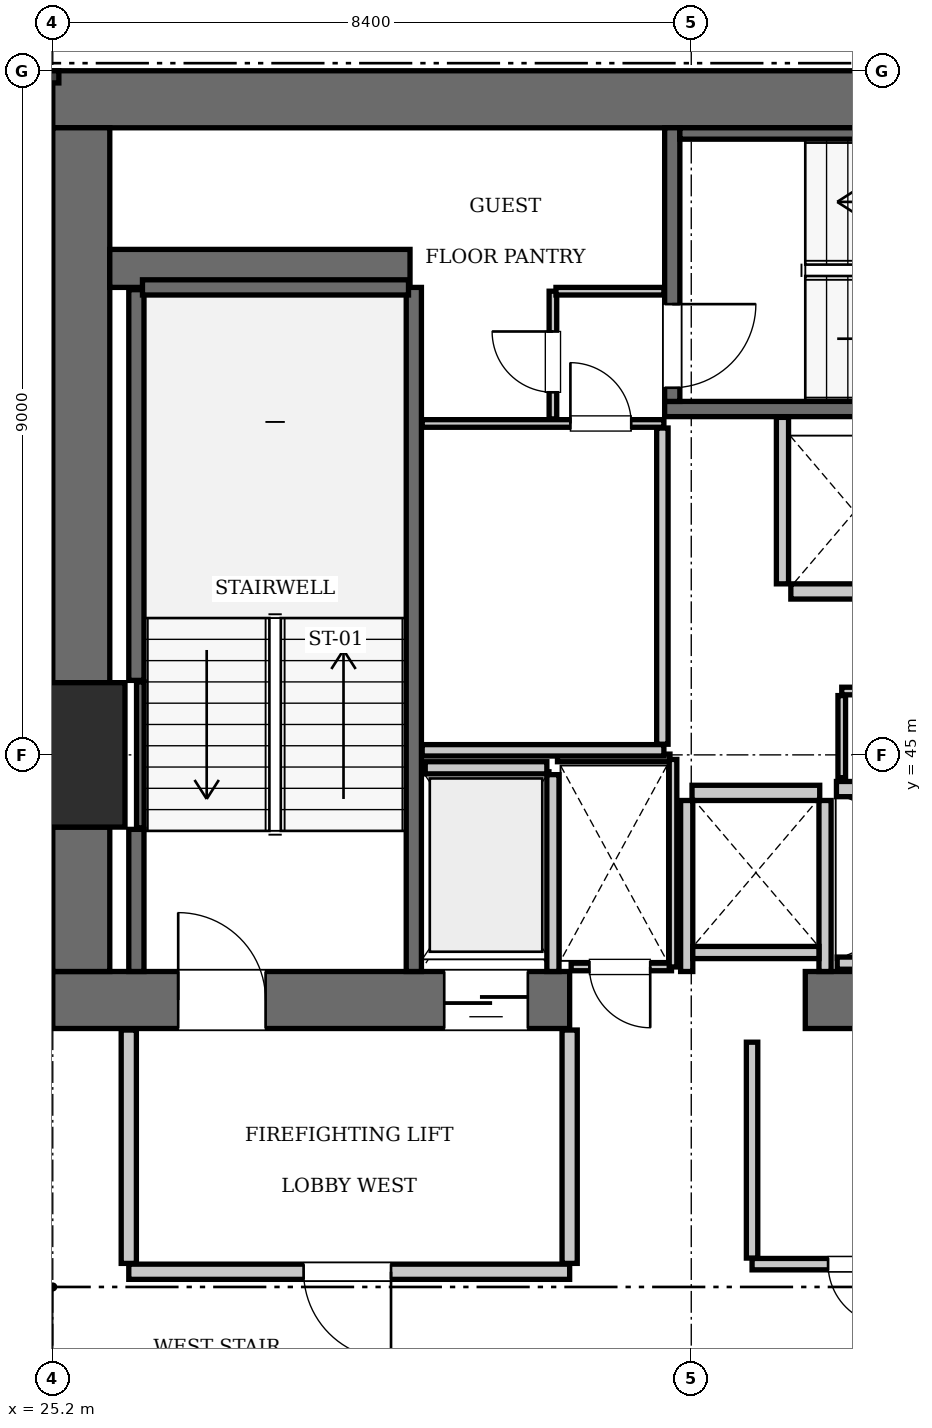
"""IFC4 building model, lengths in metres.
Left out: names, types, materials, properties, quantities, classifications, styles, units other than length and angle.
Written with IfcOpenShell. Run it as: python <this file> out.ifc"""

import sys

from ifc_helpers import new_model, si_unit, direction, frame, frame_2d, origin, origin_2d, place, context, subcontext, project, spatial, rectangle, extrude, element, fill, save


model = new_model("IFC4")
c1 = context("Model", 3, precision=1e-05, world=origin(), true_north=direction((0.0, 1.0)))
c2 = subcontext(c1, "Body", "Model", "MODEL_VIEW")
j1 = project(units=[si_unit("LENGTHUNIT", "METRE"), si_unit("PLANEANGLEUNIT", "RADIAN")], contexts=[c1])
p1 = place(None, origin())
s1 = spatial("IfcSite", under=j1, at=p1, CompositionType="ELEMENT")
p2 = place(p1, origin())
s2 = spatial("IfcBuilding", under=s1, at=p2, CompositionType="ELEMENT")
p3 = place(p2, frame((0.0, 0.0, 135.1)))
s3 = spatial("IfcBuildingStorey", under=s2, at=p3, CompositionType="ELEMENT", Elevation=135.1)
p4 = place(p3, frame((25.2, 45.0, 0.0), z_axis=(0.0, 0.0, 1.0), x_axis=(1.0, 0.0, 0.0)))
e1 = element("IfcColumn", 1, at=p4, inside=s3, PredefinedType="COLUMN", context=c2, shape_type="SweptSolid", body=[
    extrude(rectangle(XDim=1.9, YDim=1.9, at=origin_2d()), origin(), (0.0, 0.0, 1.0), 3.85),
])
p5 = place(p3, frame((25.2, 53.625, 0.0), z_axis=(0.0, 0.0, 1.0), x_axis=(1.0, 0.0, 0.0)))
e2 = element("IfcWall", 2, at=p5, inside=s3, PredefinedType="SHEAR", context=c2, shape_type="SweptSolid", body=[
    extrude(rectangle(XDim=25.2, YDim=0.75, at=frame_2d((12.6, 0.0))), origin(), (0.0, 0.0, 1.0), 3.85),
])
p6 = place(p3, frame((25.2, 41.775, 0.0), z_axis=(0.0, 0.0, 1.0), x_axis=(1.0, 0.0, 0.0)))
e3 = element("IfcWall", 3, at=p6, inside=s3, PredefinedType="SHEAR", context=c2, shape_type="SweptSolid", body=[
    extrude(rectangle(XDim=6.8, YDim=0.75, at=frame_2d((3.4, 0.0))), origin(), (0.0, 0.0, 1.0), 3.85),
])
p7 = place(p6, frame((1.65, 0.0, 0.0)))
e4 = element("IfcOpeningElement", 4, at=p7, cuts=e3, PredefinedType="OPENING", context=c2, shape_type="SweptSolid", body=[
    extrude(rectangle(XDim=1.15, YDim=2.15, at=frame_2d((0.575, 1.075))), frame((0.0, 0.385, 0.0), z_axis=(0.0, -1.0, 0.0), x_axis=(1.0, 0.0, 0.0)), (0.0, 0.0, 1.0), 0.77),
])
p8 = place(p6, frame((5.15, 0.0, 0.0)))
e5 = element("IfcOpeningElement", 5, at=p8, cuts=e3, PredefinedType="OPENING", context=c2, shape_type="SweptSolid", body=[
    extrude(rectangle(XDim=1.1, YDim=2.2, at=frame_2d((0.55, 1.1))), frame((0.0, 0.385, 0.0), z_axis=(0.0, -1.0, 0.0), x_axis=(1.0, 0.0, 0.0)), (0.0, 0.0, 1.0), 0.77),
])
p9 = place(p3, frame((35.1, 41.775, 0.0), z_axis=(0.0, 0.0, 1.0), x_axis=(1.0, 0.0, 0.0)))
e6 = element("IfcWall", 6, at=p9, inside=s3, PredefinedType="SHEAR", context=c2, shape_type="SweptSolid", body=[
    extrude(rectangle(XDim=5.4, YDim=0.75, at=frame_2d((2.7, 0.0))), origin(), (0.0, 0.0, 1.0), 3.85),
])
p10 = place(p3, frame((25.575, 42.15, 0.0), z_axis=(0.0, 0.0, 1.0), x_axis=(0.0, 1.0, 0.0)))
e7 = element("IfcWall", 7, at=p10, inside=s3, PredefinedType="SHEAR", context=c2, shape_type="SweptSolid", body=[
    extrude(rectangle(XDim=1.9, YDim=0.75, at=frame_2d((0.95, 0.0))), origin(), (0.0, 0.0, 1.0), 3.85),
])
p11 = place(p3, frame((25.575, 45.95, 0.0), z_axis=(0.0, 0.0, 1.0), x_axis=(0.0, 1.0, 0.0)))
e8 = element("IfcWall", 8, at=p11, inside=s3, PredefinedType="SHEAR", context=c2, shape_type="SweptSolid", body=[
    extrude(rectangle(XDim=7.3, YDim=0.75, at=frame_2d((3.65, 0.0))), origin(), (0.0, 0.0, 1.0), 3.85),
])
p12 = place(p3, frame((25.95, 51.4, 0.0), z_axis=(0.0, 0.0, 1.0), x_axis=(1.0, 0.0, 0.0)))
e9 = element("IfcWall", 9, at=p12, inside=s3, PredefinedType="SHEAR", context=c2, shape_type="SweptSolid", body=[
    extrude(rectangle(XDim=3.95, YDim=0.5, at=frame_2d((1.975, 0.0))), origin(), (0.0, 0.0, 1.0), 3.85),
])
p13 = place(p3, frame((29.95, 42.15, 0.0), z_axis=(0.0, 0.0, 1.0), x_axis=(0.0, 1.0, 0.0)))
e10 = element("IfcWall", 10, at=p13, inside=s3, PredefinedType="SOLIDWALL", context=c2, shape_type="SweptSolid", body=[
    extrude(rectangle(XDim=9.0, YDim=0.2, at=frame_2d((4.5, 0.0))), origin(), (0.0, 0.0, 1.0), 3.61),
])
p14 = place(p3, frame((26.3, 42.15, 0.0), z_axis=(0.0, 0.0, 1.0), x_axis=(0.0, 1.0, 0.0)))
e11 = element("IfcWall", 11, at=p14, inside=s3, PredefinedType="SOLIDWALL", context=c2, shape_type="SweptSolid", body=[
    extrude(rectangle(XDim=1.87, YDim=0.2, at=frame_2d((0.935, 0.0))), origin(), (0.0, 0.0, 1.0), 3.61),
])
p15 = place(p3, frame((26.3, 45.98, 0.0), z_axis=(0.0, 0.0, 1.0), x_axis=(0.0, 1.0, 0.0)))
e12 = element("IfcWall", 12, at=p15, inside=s3, PredefinedType="SOLIDWALL", context=c2, shape_type="SweptSolid", body=[
    extrude(rectangle(XDim=5.14, YDim=0.2, at=frame_2d((2.57, 0.0))), origin(), (0.0, 0.0, 1.0), 3.61),
])
p16 = place(p3, frame((26.38, 51.15, 0.0), z_axis=(0.0, 0.0, 1.0), x_axis=(1.0, 0.0, 0.0)))
e13 = element("IfcWall", 13, at=p16, inside=s3, PredefinedType="SOLIDWALL", context=c2, shape_type="SweptSolid", body=[
    extrude(rectangle(XDim=3.5, YDim=0.2, at=frame_2d((1.75, 0.0))), origin(), (0.0, 0.0, 1.0), 3.61),
])
p17 = place(p3, frame((26.352, 44.04, 0.0), z_axis=(0.0, 0.0, 1.0), x_axis=(0.0, 1.0, 0.0)))
e14 = element("IfcWall", 14, at=p17, inside=s3, PredefinedType="SOLIDWALL", context=c2, shape_type="SweptSolid", body=[
    extrude(rectangle(XDim=1.92, YDim=0.1, at=frame_2d((0.96, 0.0))), origin(), (0.0, 0.0, 1.0), 3.61),
])
p18 = place(p3, frame((33.25, 49.55, 0.0), z_axis=(0.0, 0.0, 1.0), x_axis=(1.0, 0.0, 0.0)))
e15 = element("IfcWall", 15, at=p18, inside=s3, PredefinedType="SOLIDWALL", context=c2, shape_type="SweptSolid", body=[
    extrude(rectangle(XDim=9.1, YDim=0.2, at=frame_2d((4.55, 0.0))), origin(), (0.0, 0.0, 1.0), 3.61),
])
p19 = place(p3, frame((33.35, 49.65, 0.0), z_axis=(0.0, 0.0, 1.0), x_axis=(0.0, 1.0, 0.0)))
e16 = element("IfcWall", 16, at=p19, inside=s3, PredefinedType="SOLIDWALL", context=c2, shape_type="SweptSolid", body=[
    extrude(rectangle(XDim=3.6, YDim=0.2, at=frame_2d((1.8, 0.0))), origin(), (0.0, 0.0, 1.0), 3.61),
])
p20 = place(p19, frame((0.18, 0.0, 0.0)))
e17 = element("IfcOpeningElement", 17, at=p20, cuts=e16, PredefinedType="OPENING", context=c2, shape_type="SweptSolid", body=[
    extrude(rectangle(XDim=1.1, YDim=2.15, at=frame_2d((0.55, 1.075))), frame((0.0, 0.11, 0.0), z_axis=(0.0, -1.0, 0.0), x_axis=(1.0, 0.0, 0.0)), (0.0, 0.0, 1.0), 0.22),
])
p21 = place(p3, frame((33.45, 53.175, 0.0), z_axis=(0.0, 0.0, 1.0), x_axis=(1.0, 0.0, 0.0)))
e18 = element("IfcWall", 18, at=p21, inside=s3, PredefinedType="SOLIDWALL", context=c2, shape_type="SweptSolid", body=[
    extrude(rectangle(XDim=8.7, YDim=0.15, at=frame_2d((4.35, 0.0))), origin(), (0.0, 0.0, 1.0), 3.61),
])
p22 = place(p3, frame((35.51, 44.55, 0.0), z_axis=(0.0, 0.0, 1.0), x_axis=(1.0, 0.0, 0.0)))
e19 = element("IfcWall", 19, at=p22, inside=s3, PredefinedType="SOLIDWALL", context=c2, shape_type="SweptSolid", body=[
    extrude(rectangle(XDim=1.68, YDim=0.2, at=frame_2d((0.84, 0.0))), origin(), (0.0, 0.0, 1.0), 3.61),
])
p23 = place(p3, frame((34.91, 47.15, 0.0), z_axis=(0.0, 0.0, 1.0), x_axis=(1.0, 0.0, 0.0)))
e20 = element("IfcWall", 20, at=p23, inside=s3, PredefinedType="SOLIDWALL", context=c2, shape_type="SweptSolid", body=[
    extrude(rectangle(XDim=1.68, YDim=0.2, at=frame_2d((0.84, 0.0))), origin(), (0.0, 0.0, 1.0), 3.61),
])
p24 = place(p3, frame((33.61, 44.5, 0.0), z_axis=(0.0, 0.0, 1.0), x_axis=(1.0, 0.0, 0.0)))
e21 = element("IfcWall", 21, at=p24, inside=s3, PredefinedType="SOLIDWALL", context=c2, shape_type="SweptSolid", body=[
    extrude(rectangle(XDim=1.68, YDim=0.2, at=frame_2d((0.84, 0.0))), origin(), (0.0, 0.0, 1.0), 3.61),
])
p25 = place(p3, frame((30.1, 44.83, 0.0), z_axis=(0.0, 0.0, 1.0), x_axis=(1.0, 0.0, 0.0)))
e22 = element("IfcWall", 22, at=p25, inside=s3, PredefinedType="SOLIDWALL", context=c2, shape_type="SweptSolid", body=[
    extrude(rectangle(XDim=1.6, YDim=0.16, at=frame_2d((0.8, 0.0))), origin(), (0.0, 0.0, 1.0), 3.61),
])
p26 = place(p3, frame((31.78, 42.15, 0.0), z_axis=(0.0, 0.0, 1.0), x_axis=(0.0, 1.0, 0.0)))
e23 = element("IfcWall", 23, at=p26, inside=s3, PredefinedType="SOLIDWALL", context=c2, shape_type="SweptSolid", body=[
    extrude(rectangle(XDim=2.59, YDim=0.16, at=frame_2d((1.295, 0.0))), origin(), (0.0, 0.0, 1.0), 3.61),
])
p27 = place(p3, frame((35.52, 42.26, 0.0), z_axis=(0.0, 0.0, 1.0), x_axis=(1.0, 0.0, 0.0)))
e24 = element("IfcWall", 24, at=p27, inside=s3, PredefinedType="SOLIDWALL", context=c2, shape_type="SweptSolid", body=[
    extrude(rectangle(XDim=5.02, YDim=0.16, at=frame_2d((2.51, 0.0))), origin(), (0.0, 0.0, 1.0), 3.61),
])
p28 = place(p3, frame((34.8, 47.25, 0.0), z_axis=(0.0, 0.0, 1.0), x_axis=(0.0, 1.0, 0.0)))
e25 = element("IfcWall", 25, at=p28, inside=s3, PredefinedType="SOLIDWALL", context=c2, shape_type="SweptSolid", body=[
    extrude(rectangle(XDim=2.19, YDim=0.16, at=frame_2d((1.095, 0.0))), origin(), (0.0, 0.0, 1.0), 3.61),
])
for number, where, z_axis, x_axis in (
    (26, (33.54, 42.15, 0.0), (0.0, 0.0, 1.0), (0.0, 1.0, 0.0)),
    (27, (35.36, 42.15, 0.0), (0.0, 0.0, 1.0), (0.0, 1.0, 0.0)),
):
    element("IfcWall", number, at=place(p3, frame(where, z_axis=z_axis, x_axis=x_axis)), inside=s3, PredefinedType="SOLIDWALL", context=c2, shape_type="SweptSolid", body=[
        extrude(rectangle(XDim=2.25, YDim=0.16, at=frame_2d((1.125, 0.0))), origin(), (0.0, 0.0, 1.0), 3.61),
    ])
p29 = place(p3, frame((33.62, 42.4, 0.0), z_axis=(0.0, 0.0, 1.0), x_axis=(1.0, 0.0, 0.0)))
e28 = element("IfcWall", 28, at=p29, inside=s3, PredefinedType="SOLIDWALL", context=c2, shape_type="SweptSolid", body=[
    extrude(rectangle(XDim=1.66, YDim=0.16, at=frame_2d((0.83, 0.0))), origin(), (0.0, 0.0, 1.0), 3.61),
])
p30 = place(p3, frame((26.2, 38.2, 0.0), z_axis=(0.0, 0.0, 1.0), x_axis=(1.0, 0.0, 0.0)))
e29 = element("IfcWall", 29, at=p30, inside=s3, PredefinedType="PARTITIONING", context=c2, shape_type="SweptSolid", body=[
    extrude(rectangle(XDim=5.8, YDim=0.2, at=frame_2d((2.9, 0.0))), origin(), (0.0, 0.0, 1.0), 3.61),
])
p31 = place(p30, frame((2.3, 0.0, 0.0)))
e30 = element("IfcOpeningElement", 30, at=p31, cuts=e29, PredefinedType="OPENING", context=c2, shape_type="SweptSolid", body=[
    extrude(rectangle(XDim=1.15, YDim=2.15, at=frame_2d((0.575, 1.075))), frame((0.0, 0.11, 0.0), z_axis=(0.0, -1.0, 0.0), x_axis=(1.0, 0.0, 0.0)), (0.0, 0.0, 1.0), 0.22),
])
for number, where, z_axis, x_axis in (
    (31, (26.2, 38.31, 0.0), (0.0, 0.0, 1.0), (0.0, 1.0, 0.0)),
    (32, (32.0, 38.31, 0.0), (0.0, 0.0, 1.0), (0.0, 1.0, 0.0)),
):
    element("IfcWall", number, at=place(p3, frame(where, z_axis=z_axis, x_axis=x_axis)), inside=s3, PredefinedType="PARTITIONING", context=c2, shape_type="SweptSolid", body=[
        extrude(rectangle(XDim=3.07, YDim=0.2, at=frame_2d((1.535, 0.0))), origin(), (0.0, 0.0, 1.0), 3.61),
    ])
p32 = place(p3, frame((32.02, 42.21, 0.0), z_axis=(0.0, 0.0, 1.0), x_axis=(1.0, 0.0, 0.0)))
e33 = element("IfcWall", 33, at=p32, inside=s3, PredefinedType="PARTITIONING", context=c2, shape_type="SweptSolid", body=[
    extrude(rectangle(XDim=1.32, YDim=0.1, at=frame_2d((0.66, 0.0))), origin(), (0.0, 0.0, 1.0), 3.61),
])
p33 = place(p32, frame((0.24, 0.0, 0.0)))
e34 = element("IfcOpeningElement", 34, at=p33, cuts=e33, PredefinedType="OPENING", context=c2, shape_type="SweptSolid", body=[
    extrude(rectangle(XDim=0.8, YDim=2.05, at=frame_2d((0.4, 1.025))), frame((0.0, 0.06, 0.0), z_axis=(0.0, -1.0, 0.0), x_axis=(1.0, 0.0, 0.0)), (0.0, 0.0, 1.0), 0.12),
])
p34 = place(p3, frame((31.84, 44.96, 0.0), z_axis=(0.0, 0.0, 1.0), x_axis=(1.0, 0.0, 0.0)))
e35 = element("IfcWall", 35, at=p34, inside=s3, PredefinedType="PARTITIONING", context=c2, shape_type="SweptSolid", body=[
    extrude(rectangle(XDim=1.48, YDim=0.1, at=frame_2d((0.74, 0.0))), origin(), (0.0, 0.0, 1.0), 3.61),
])
p35 = place(p3, frame((33.36, 42.21, 0.0), z_axis=(0.0, 0.0, 1.0), x_axis=(0.0, 1.0, 0.0)))
e36 = element("IfcWall", 36, at=p35, inside=s3, PredefinedType="PARTITIONING", context=c2, shape_type="SweptSolid", body=[
    extrude(rectangle(XDim=2.73, YDim=0.1, at=frame_2d((1.365, 0.0))), origin(), (0.0, 0.0, 1.0), 3.61),
])
p36 = place(p3, frame((35.58, 45.84, 0.0), z_axis=(0.0, 0.0, 1.0), x_axis=(1.0, 0.0, 0.0)))
e37 = element("IfcWall", 37, at=p36, inside=s3, PredefinedType="PARTITIONING", context=c2, shape_type="SweptSolid", body=[
    extrude(rectangle(XDim=2.36, YDim=0.1, at=frame_2d((1.18, 0.0))), origin(), (0.0, 0.0, 1.0), 3.61),
])
p37 = place(p36, frame((0.7, 0.0, 0.0)))
e38 = element("IfcOpeningElement", 38, at=p37, cuts=e37, PredefinedType="OPENING", context=c2, shape_type="SweptSolid", body=[
    extrude(rectangle(XDim=0.8, YDim=2.05, at=frame_2d((0.4, 1.025))), frame((0.0, 0.06, 0.0), z_axis=(0.0, -1.0, 0.0), x_axis=(1.0, 0.0, 0.0)), (0.0, 0.0, 1.0), 0.12),
])
p38 = place(p3, frame((35.58, 44.7, 0.0), z_axis=(0.0, 0.0, 1.0), x_axis=(0.0, 1.0, 0.0)))
e39 = element("IfcWall", 39, at=p38, inside=s3, PredefinedType="PARTITIONING", context=c2, shape_type="SweptSolid", body=[
    extrude(rectangle(XDim=1.08, YDim=0.1, at=frame_2d((0.54, 0.0))), origin(), (0.0, 0.0, 1.0), 3.61),
])
p39 = place(p3, frame((30.06, 45.06, 0.0), z_axis=(0.0, 0.0, 1.0), x_axis=(1.0, 0.0, 0.0)))
e40 = element("IfcWall", 40, at=p39, inside=s3, PredefinedType="PARTITIONING", context=c2, shape_type="SweptSolid", body=[
    extrude(rectangle(XDim=3.18, YDim=0.15, at=frame_2d((1.59, 0.0))), origin(), (0.0, 0.0, 1.0), 3.61),
])
p40 = place(p3, frame((33.22, 45.14, 0.0), z_axis=(0.0, 0.0, 1.0), x_axis=(0.0, 1.0, 0.0)))
e41 = element("IfcWall", 41, at=p40, inside=s3, PredefinedType="PARTITIONING", context=c2, shape_type="SweptSolid", body=[
    extrude(rectangle(XDim=4.16, YDim=0.15, at=frame_2d((2.08, 0.0))), origin(), (0.0, 0.0, 1.0), 3.61),
])
p41 = place(p3, frame((30.06, 49.36, 0.0), z_axis=(0.0, 0.0, 1.0), x_axis=(1.0, 0.0, 0.0)))
e42 = element("IfcWall", 42, at=p41, inside=s3, PredefinedType="PARTITIONING", context=c2, shape_type="SweptSolid", body=[
    extrude(rectangle(XDim=3.18, YDim=0.1, at=frame_2d((1.59, 0.0))), origin(), (0.0, 0.0, 1.0), 3.61),
])
p42 = place(p41, frame((1.95, 0.0, 0.0)))
e43 = element("IfcOpeningElement", 43, at=p42, cuts=e42, PredefinedType="OPENING", context=c2, shape_type="SweptSolid", body=[
    extrude(rectangle(XDim=0.8, YDim=2.05, at=frame_2d((0.4, 1.025))), frame((0.0, 0.06, 0.0), z_axis=(0.0, -1.0, 0.0), x_axis=(1.0, 0.0, 0.0)), (0.0, 0.0, 1.0), 0.12),
])
p43 = place(p3, frame((31.78, 49.42, 0.0), z_axis=(0.0, 0.0, 1.0), x_axis=(0.0, 1.0, 0.0)))
e44 = element("IfcWall", 44, at=p43, inside=s3, PredefinedType="PARTITIONING", context=c2, shape_type="SweptSolid", body=[
    extrude(rectangle(XDim=1.68, YDim=0.1, at=frame_2d((0.84, 0.0))), origin(), (0.0, 0.0, 1.0), 3.61),
])
p44 = place(p43, frame((0.35, 0.0, 0.0)))
e45 = element("IfcOpeningElement", 45, at=p44, cuts=e44, PredefinedType="OPENING", context=c2, shape_type="SweptSolid", body=[
    extrude(rectangle(XDim=0.8, YDim=2.05, at=frame_2d((0.4, 1.025))), frame((0.0, 0.06, 0.0), z_axis=(0.0, -1.0, 0.0), x_axis=(1.0, 0.0, 0.0)), (0.0, 0.0, 1.0), 0.12),
])
p45 = place(p3, frame((31.82, 51.1, 0.0), z_axis=(0.0, 0.0, 1.0), x_axis=(1.0, 0.0, 0.0)))
e46 = element("IfcWall", 46, at=p45, inside=s3, PredefinedType="PARTITIONING", context=c2, shape_type="SweptSolid", body=[
    extrude(rectangle(XDim=1.42, YDim=0.1, at=frame_2d((0.71, 0.0))), origin(), (0.0, 0.0, 1.0), 3.61),
])
p46 = place(p3, frame((34.4, 38.3, 0.0), z_axis=(0.0, 0.0, 1.0), x_axis=(1.0, 0.0, 0.0)))
e47 = element("IfcWall", 47, at=p46, inside=s3, PredefinedType="PARTITIONING", context=c2, shape_type="SweptSolid", body=[
    extrude(rectangle(XDim=2.88, YDim=0.15, at=frame_2d((1.44, 0.0))), origin(), (0.0, 0.0, 1.0), 3.61),
])
p47 = place(p46, frame((1.0, 0.0, 0.0)))
e48 = element("IfcOpeningElement", 48, at=p47, cuts=e47, PredefinedType="OPENING", context=c2, shape_type="SweptSolid", body=[
    extrude(rectangle(XDim=0.8, YDim=2.05, at=frame_2d((0.4, 1.025))), frame((0.0, 0.085, 0.0), z_axis=(0.0, -1.0, 0.0), x_axis=(1.0, 0.0, 0.0)), (0.0, 0.0, 1.0), 0.17),
])
p48 = place(p3, frame((34.4, 38.38, 0.0), z_axis=(0.0, 0.0, 1.0), x_axis=(0.0, 1.0, 0.0)))
e49 = element("IfcWall", 49, at=p48, inside=s3, PredefinedType="PARTITIONING", context=c2, shape_type="SweptSolid", body=[
    extrude(rectangle(XDim=2.84, YDim=0.15, at=frame_2d((1.42, 0.0))), origin(), (0.0, 0.0, 1.0), 3.61),
])
p49 = place(p7, origin())
e50 = element("IfcDoor", 50, at=p49, inside=s3, OperationType="SINGLE_SWING_LEFT", PredefinedType="DOOR", context=c2, shape_type="SweptSolid", body=[
    extrude(rectangle(XDim=1.15, YDim=2.15, at=frame_2d((0.575, 1.075))), frame((0.0, 0.025, 0.0), z_axis=(0.0, -1.0, 0.0), x_axis=(1.0, 0.0, 0.0)), (0.0, 0.0, 1.0), 0.05),
])
fill(e4, e50)
p50 = place(p20, frame((1.1, 0.0, 0.0), z_axis=(0.0, 0.0, 1.0), x_axis=(-1.0, 0.0, 0.0)))
e51 = element("IfcDoor", 51, at=p50, inside=s3, OperationType="SINGLE_SWING_LEFT", PredefinedType="DOOR", context=c2, shape_type="SweptSolid", body=[
    extrude(rectangle(XDim=1.1, YDim=2.15, at=frame_2d((0.55, 1.075))), frame((0.0, 0.025, 0.0), z_axis=(0.0, -1.0, 0.0), x_axis=(1.0, 0.0, 0.0)), (0.0, 0.0, 1.0), 0.05),
])
fill(e17, e51)
p51 = place(p8, frame((1.1, 0.0, 0.0), z_axis=(0.0, 0.0, 1.0), x_axis=(-1.0, 0.0, 0.0)))
e52 = element("IfcDoor", 52, at=p51, inside=s3, OperationType="SLIDING_TO_LEFT", PredefinedType="DOOR", context=c2, shape_type="SweptSolid", body=[
    extrude(rectangle(XDim=1.1, YDim=2.2, at=frame_2d((0.55, 1.1))), frame((0.0, 0.025, 0.0), z_axis=(0.0, -1.0, 0.0), x_axis=(1.0, 0.0, 0.0)), (0.0, 0.0, 1.0), 0.05),
])
fill(e5, e52)
p52 = place(p31, frame((1.15, 0.0, 0.0), z_axis=(0.0, 0.0, 1.0), x_axis=(-1.0, 0.0, 0.0)))
e53 = element("IfcDoor", 53, at=p52, inside=s3, OperationType="SINGLE_SWING_LEFT", PredefinedType="DOOR", context=c2, shape_type="SweptSolid", body=[
    extrude(rectangle(XDim=1.15, YDim=2.15, at=frame_2d((0.575, 1.075))), frame((0.0, 0.025, 0.0), z_axis=(0.0, -1.0, 0.0), x_axis=(1.0, 0.0, 0.0)), (0.0, 0.0, 1.0), 0.05),
])
fill(e30, e53)
p53 = place(p33, frame((0.8, 0.0, 0.0), z_axis=(0.0, 0.0, 1.0), x_axis=(-1.0, 0.0, 0.0)))
e54 = element("IfcDoor", 54, at=p53, inside=s3, OperationType="SINGLE_SWING_LEFT", PredefinedType="DOOR", context=c2, shape_type="SweptSolid", body=[
    extrude(rectangle(XDim=0.8, YDim=2.05, at=frame_2d((0.4, 1.025))), frame((0.0, 0.025, 0.0), z_axis=(0.0, -1.0, 0.0), x_axis=(1.0, 0.0, 0.0)), (0.0, 0.0, 1.0), 0.05),
])
fill(e34, e54)
p54 = place(p42, origin())
e55 = element("IfcDoor", 55, at=p54, inside=s3, OperationType="SINGLE_SWING_LEFT", PredefinedType="DOOR", context=c2, shape_type="SweptSolid", body=[
    extrude(rectangle(XDim=0.8, YDim=2.05, at=frame_2d((0.4, 1.025))), frame((0.0, 0.025, 0.0), z_axis=(0.0, -1.0, 0.0), x_axis=(1.0, 0.0, 0.0)), (0.0, 0.0, 1.0), 0.05),
])
fill(e43, e55)
p55 = place(p44, origin())
e56 = element("IfcDoor", 56, at=p55, inside=s3, OperationType="SINGLE_SWING_RIGHT", PredefinedType="DOOR", context=c2, shape_type="SweptSolid", body=[
    extrude(rectangle(XDim=0.8, YDim=2.05, at=frame_2d((0.4, 1.025))), frame((0.0, 0.025, 0.0), z_axis=(0.0, -1.0, 0.0), x_axis=(1.0, 0.0, 0.0)), (0.0, 0.0, 1.0), 0.05),
])
fill(e45, e56)
p56 = place(p47, frame((0.8, 0.0, 0.0), z_axis=(0.0, 0.0, 1.0), x_axis=(-1.0, 0.0, 0.0)))
e57 = element("IfcDoor", 57, at=p56, inside=s3, OperationType="SINGLE_SWING_LEFT", PredefinedType="DOOR", context=c2, shape_type="SweptSolid", body=[
    extrude(rectangle(XDim=0.8, YDim=2.05, at=frame_2d((0.4, 1.025))), frame((0.0, 0.025, 0.0), z_axis=(0.0, -1.0, 0.0), x_axis=(1.0, 0.0, 0.0)), (0.0, 0.0, 1.0), 0.05),
])
fill(e48, e57)
save(model, sys.argv[1])
